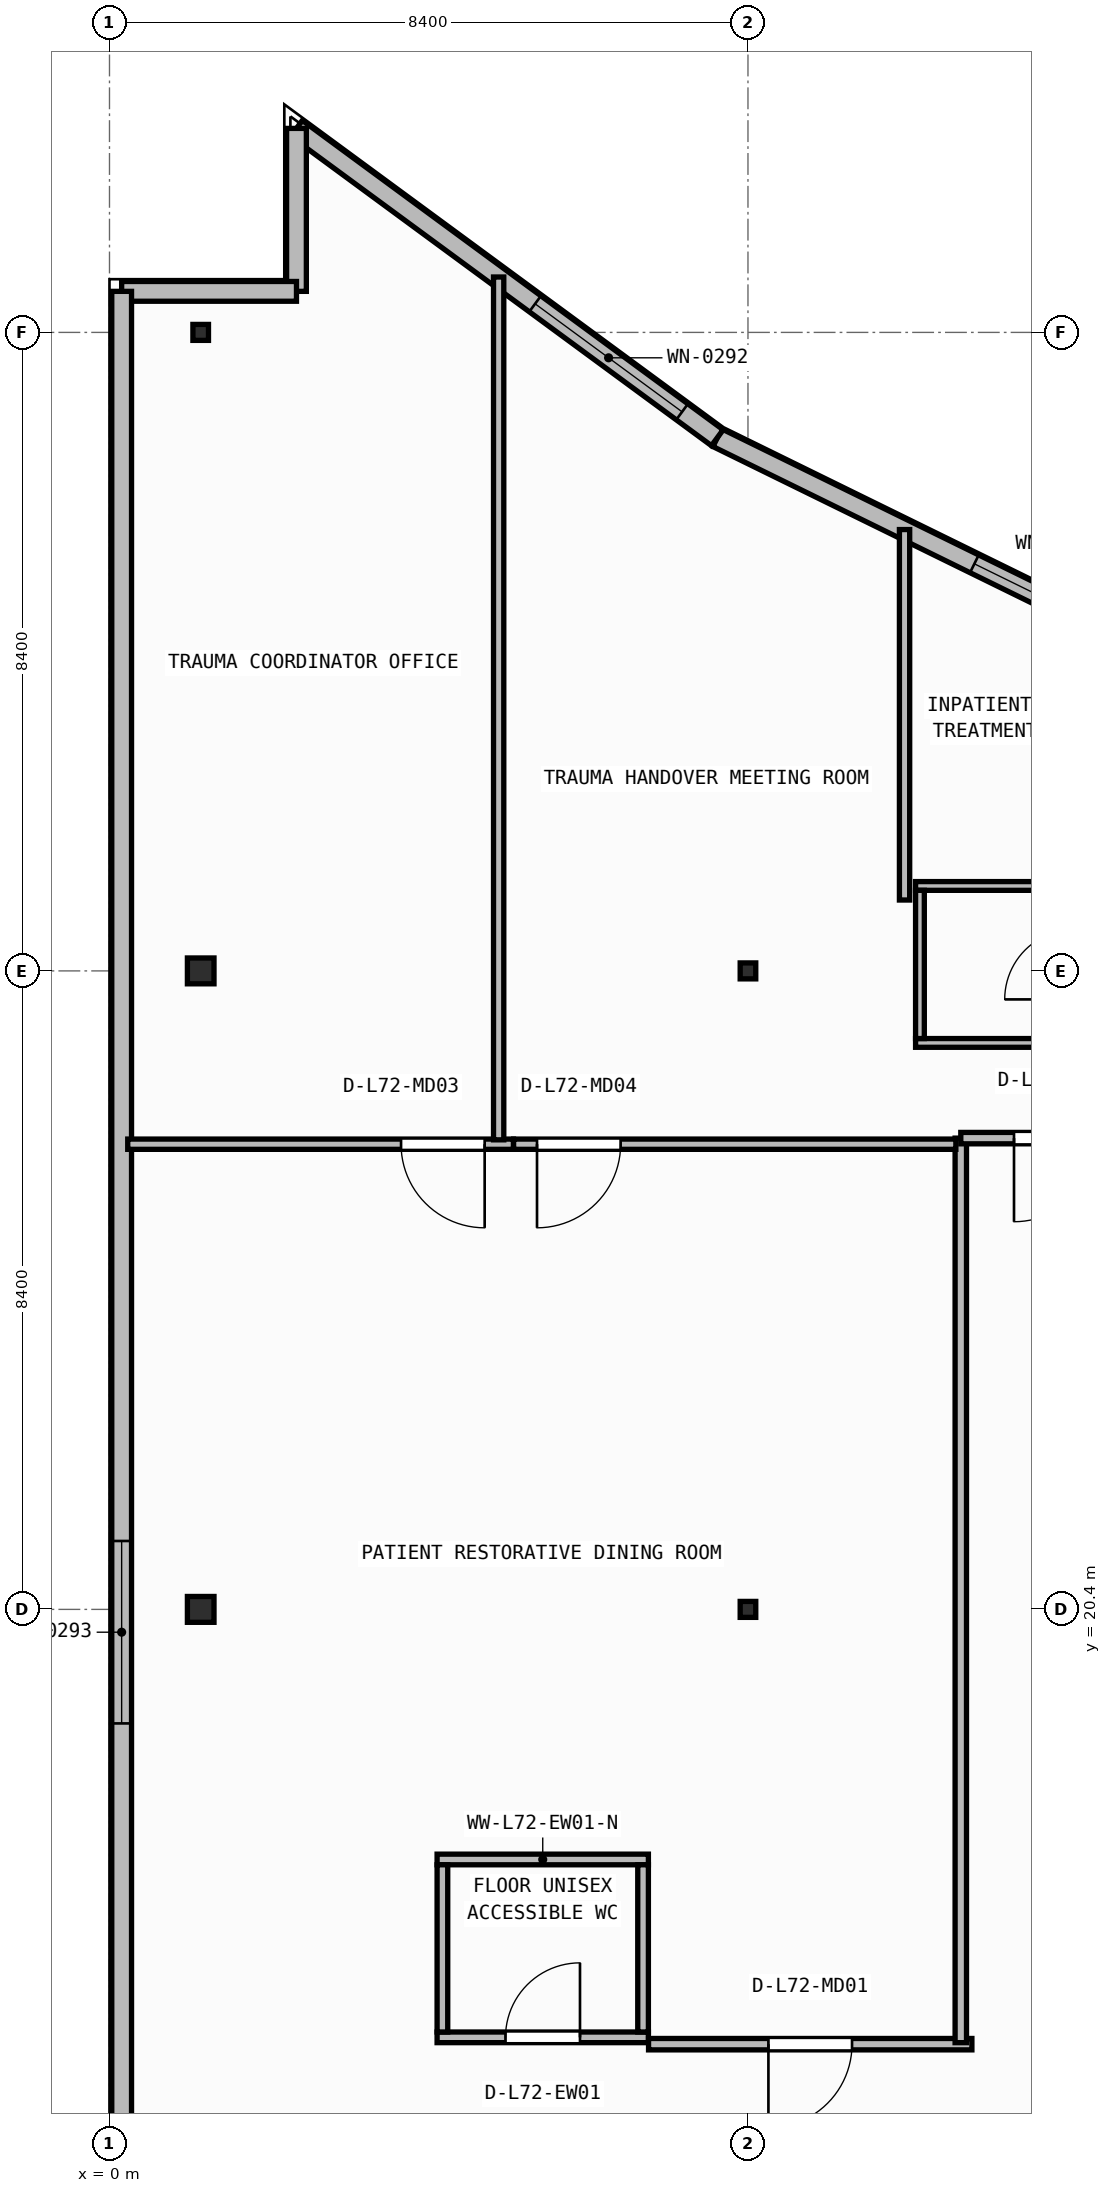
"""IFC4 building model, lengths in metres.
Left out: names, types, materials, properties, quantities, classifications, styles, units other than length and angle.
Written with IfcOpenShell. Run it as: python <this file> out.ifc"""

import sys

from ifc_helpers import new_model, si_unit, direction, frame, frame_2d, origin, origin_2d, place, context, subcontext, project, spatial, rectangle, i_section, extrude, element, fill, save


model = new_model("IFC4")
c1 = context("Model", 3, precision=1e-05, world=origin(), true_north=direction((0.0, 1.0)))
c2 = subcontext(c1, "Body", "Model", "MODEL_VIEW")
j1 = project(units=[si_unit("LENGTHUNIT", "METRE"), si_unit("PLANEANGLEUNIT", "RADIAN")], contexts=[c1])
p1 = place(None, origin())
s1 = spatial("IfcSite", under=j1, at=p1, CompositionType="ELEMENT")
p2 = place(p1, origin())
s2 = spatial("IfcBuilding", under=s1, at=p2, CompositionType="ELEMENT")
p3 = place(p2, frame((0.0, 0.0, 292.1)))
s3 = spatial("IfcBuildingStorey", under=s2, at=p3, CompositionType="ELEMENT", Elevation=292.1)
p4 = place(p3, frame((1.2, 20.4, 0.0), z_axis=(0.0, 0.0, 1.0), x_axis=(1.0, 0.0, 0.0)))
e1 = element("IfcColumn", 1, at=p4, inside=s3, PredefinedType="COLUMN", context=c2, shape_type="SweptSolid", body=[
    extrude(i_section(OverallWidth=0.35, OverallDepth=0.34, WebThickness=0.016, FlangeThickness=0.028, at=origin_2d()), origin(), (0.0, 0.0, 1.0), 3.95),
])
p5 = place(p3, frame((8.4, 20.4, 0.0), z_axis=(0.0, 0.0, 1.0), x_axis=(1.0, 0.0, 0.0)))
e2 = element("IfcColumn", 2, at=p5, inside=s3, PredefinedType="COLUMN", context=c2, shape_type="SweptSolid", body=[
    extrude(i_section(OverallWidth=0.205, OverallDepth=0.21, WebThickness=0.009, FlangeThickness=0.014, FilletRadius=0.011, at=origin_2d()), origin(), (0.0, 0.0, 1.0), 3.95),
])
p6 = place(p3, frame((1.2, 28.8, 0.0), z_axis=(0.0, 0.0, 1.0), x_axis=(1.0, 0.0, 0.0)))
e3 = element("IfcColumn", 3, at=p6, inside=s3, PredefinedType="COLUMN", context=c2, shape_type="SweptSolid", body=[
    extrude(i_section(OverallWidth=0.35, OverallDepth=0.34, WebThickness=0.016, FlangeThickness=0.028, at=origin_2d()), origin(), (0.0, 0.0, 1.0), 3.95),
])
for number, where, z_axis, x_axis in (
    (4, (8.4, 28.8, 0.0), (0.0, 0.0, 1.0), (1.0, 0.0, 0.0)),
    (5, (1.2, 37.2, 0.0), (0.0, 0.0, 1.0), (1.0, 0.0, 0.0)),
):
    element("IfcColumn", number, at=place(p3, frame(where, z_axis=z_axis, x_axis=x_axis)), inside=s3, PredefinedType="COLUMN", context=c2, shape_type="SweptSolid", body=[
        extrude(i_section(OverallWidth=0.205, OverallDepth=0.21, WebThickness=0.009, FlangeThickness=0.014, FilletRadius=0.011, at=origin_2d()), origin(), (0.0, 0.0, 1.0), 3.95),
    ])
p7 = place(p3, frame((16.915, 31.44, 0.0), z_axis=(0.0, 0.0, 1.0), x_axis=(-0.897793077248, 0.440417518322, 0.0)))
e6 = element("IfcWall", 6, at=p7, inside=s3, PredefinedType="STANDARD", context=c2, shape_type="SweptSolid", body=[
    extrude(rectangle(XDim=9.934, YDim=0.26, at=frame_2d((4.967, 0.0))), origin(), (0.0, 0.0, 1.0), 3.71),
])
p8 = place(p7, frame((3.767, 0.0, 0.9)))
e7 = element("IfcOpeningElement", 7, at=p8, cuts=e6, PredefinedType="OPENING", context=c2, shape_type="SweptSolid", body=[
    extrude(rectangle(XDim=2.4, YDim=1.65, at=frame_2d((1.2, 0.825))), frame((0.0, 0.14, 0.0), z_axis=(0.0, -1.0, 0.0), x_axis=(1.0, 0.0, 0.0)), (0.0, 0.0, 1.0), 0.28),
])
p9 = place(p3, frame((7.997, 35.815, 0.0), z_axis=(0.0, 0.0, 1.0), x_axis=(-0.805786654178, 0.592205933733, 0.0)))
e8 = element("IfcWall", 8, at=p9, inside=s3, PredefinedType="STANDARD", context=c2, shape_type="SweptSolid", body=[
    extrude(rectangle(XDim=6.871, YDim=0.26, at=frame_2d((3.436, 0.0))), origin(), (0.0, 0.0, 1.0), 3.71),
])
p10 = place(p9, frame((0.575, 0.0, 0.9)))
e9 = element("IfcOpeningElement", 9, at=p10, cuts=e8, PredefinedType="OPENING", context=c2, shape_type="SweptSolid", body=[
    extrude(rectangle(XDim=2.4, YDim=1.65, at=frame_2d((1.2, 0.825))), frame((0.0, 0.14, 0.0), z_axis=(0.0, -1.0, 0.0), x_axis=(1.0, 0.0, 0.0)), (0.0, 0.0, 1.0), 0.28),
])
p11 = place(p3, frame((2.46, 39.884, 0.0), z_axis=(0.0, 0.0, 1.0), x_axis=(0.0, -1.0, 0.0)))
e10 = element("IfcWall", 10, at=p11, inside=s3, PredefinedType="STANDARD", context=c2, shape_type="SweptSolid", body=[
    extrude(rectangle(XDim=2.144, YDim=0.26, at=frame_2d((1.072, 0.0))), origin(), (0.0, 0.0, 1.0), 3.71),
])
p12 = place(p3, frame((2.46, 37.74, 0.0), z_axis=(0.0, 0.0, 1.0), x_axis=(-1.0, 0.0, 0.0)))
e11 = element("IfcWall", 11, at=p12, inside=s3, PredefinedType="STANDARD", context=c2, shape_type="SweptSolid", body=[
    extrude(rectangle(XDim=2.3, YDim=0.26, at=frame_2d((1.15, 0.0))), origin(), (0.0, 0.0, 1.0), 3.71),
])
p13 = place(p3, frame((0.16, 37.74, 0.0), z_axis=(0.0, 0.0, 1.0), x_axis=(0.0, -1.0, 0.0)))
e12 = element("IfcWall", 12, at=p13, inside=s3, PredefinedType="STANDARD", context=c2, shape_type="SweptSolid", body=[
    extrude(rectangle(XDim=35.28, YDim=0.26, at=frame_2d((17.64, 0.0))), origin(), (0.0, 0.0, 1.0), 3.71),
])
p14 = place(p13, frame((16.44, 0.0, 0.9)))
e13 = element("IfcOpeningElement", 13, at=p14, cuts=e12, PredefinedType="OPENING", context=c2, shape_type="SweptSolid", body=[
    extrude(rectangle(XDim=2.4, YDim=1.65, at=frame_2d((1.2, 0.825))), frame((0.0, 0.14, 0.0), z_axis=(0.0, -1.0, 0.0), x_axis=(1.0, 0.0, 0.0)), (0.0, 0.0, 1.0), 0.28),
])
p15 = place(p3, frame((4.31, 14.77, 0.0), z_axis=(0.0, 0.0, 1.0), x_axis=(1.0, 0.0, 0.0)))
e14 = element("IfcWall", 14, at=p15, inside=s3, PredefinedType="PARTITIONING", context=c2, shape_type="SweptSolid", body=[
    extrude(rectangle(XDim=2.78, YDim=0.14, at=frame_2d((1.39, 0.0))), origin(), (0.0, 0.0, 1.0), 3.71),
])
p16 = place(p15, frame((0.9, 0.0, 0.0)))
e15 = element("IfcOpeningElement", 15, at=p16, cuts=e14, PredefinedType="OPENING", context=c2, shape_type="SweptSolid", body=[
    extrude(rectangle(XDim=0.98, YDim=2.1, at=frame_2d((0.49, 1.05))), frame((0.0, 0.08, 0.0), z_axis=(0.0, -1.0, 0.0), x_axis=(1.0, 0.0, 0.0)), (0.0, 0.0, 1.0), 0.16),
])
p17 = place(p3, frame((4.31, 17.11, 0.0), z_axis=(0.0, 0.0, 1.0), x_axis=(1.0, 0.0, 0.0)))
e16 = element("IfcWall", 16, at=p17, inside=s3, PredefinedType="PARTITIONING", context=c2, shape_type="SweptSolid", body=[
    extrude(rectangle(XDim=2.78, YDim=0.14, at=frame_2d((1.39, 0.0))), origin(), (0.0, 0.0, 1.0), 3.71),
])
for number, where, z_axis, x_axis in (
    (17, (4.38, 14.84, 0.0), (0.0, 0.0, 1.0), (0.0, 1.0, 0.0)),
    (18, (7.02, 14.84, 0.0), (0.0, 0.0, 1.0), (0.0, 1.0, 0.0)),
):
    element("IfcWall", number, at=place(p3, frame(where, z_axis=z_axis, x_axis=x_axis)), inside=s3, PredefinedType="PARTITIONING", context=c2, shape_type="SweptSolid", body=[
        extrude(rectangle(XDim=2.2, YDim=0.14, at=frame_2d((1.1, 0.0))), origin(), (0.0, 0.0, 1.0), 3.71),
    ])
for number, where, z_axis, x_axis in (
    (19, (10.605, 27.853, 0.0), (0.0, 0.0, 1.0), (1.0, 0.0, 0.0)),
    (20, (10.605, 29.917, 0.0), (0.0, 0.0, 1.0), (1.0, 0.0, 0.0)),
):
    element("IfcWall", number, at=place(p3, frame(where, z_axis=z_axis, x_axis=x_axis)), inside=s3, PredefinedType="PARTITIONING", context=c2, shape_type="SweptSolid", body=[
        extrude(rectangle(XDim=2.15, YDim=0.115, at=frame_2d((1.075, 0.0))), origin(), (0.0, 0.0, 1.0), 3.71),
    ])
p18 = place(p3, frame((10.663, 27.91, 0.0), z_axis=(0.0, 0.0, 1.0), x_axis=(0.0, 1.0, 0.0)))
e21 = element("IfcWall", 21, at=p18, inside=s3, PredefinedType="PARTITIONING", context=c2, shape_type="SweptSolid", body=[
    extrude(rectangle(XDim=1.95, YDim=0.115, at=frame_2d((0.975, 0.0))), origin(), (0.0, 0.0, 1.0), 3.71),
])
p19 = place(p3, frame((11.346, 14.68, 0.0), z_axis=(0.0, 0.0, 1.0), x_axis=(-1.0, 0.0, 0.0)))
e22 = element("IfcWall", 22, at=p19, inside=s3, PredefinedType="PARTITIONING", context=c2, shape_type="SweptSolid", body=[
    extrude(rectangle(XDim=4.254, YDim=0.15, at=frame_2d((2.127, 0.0))), origin(), (0.0, 0.0, 1.0), 3.71),
])
p20 = place(p19, frame((1.577, 0.0, 0.0)))
e23 = element("IfcOpeningElement", 23, at=p20, cuts=e22, PredefinedType="OPENING", context=c2, shape_type="SweptSolid", body=[
    extrude(rectangle(XDim=1.1, YDim=2.1, at=frame_2d((0.55, 1.05))), frame((0.0, 0.085, 0.0), z_axis=(0.0, -1.0, 0.0), x_axis=(1.0, 0.0, 0.0)), (0.0, 0.0, 1.0), 0.17),
])
p21 = place(p3, frame((11.2, 26.6, 0.0), z_axis=(0.0, 0.0, 1.0), x_axis=(0.0, -1.0, 0.0)))
e24 = element("IfcWall", 24, at=p21, inside=s3, PredefinedType="PARTITIONING", context=c2, shape_type="SweptSolid", body=[
    extrude(rectangle(XDim=11.9, YDim=0.15, at=frame_2d((5.95, 0.0))), origin(), (0.0, 0.0, 1.0), 3.71),
])
p22 = place(p3, frame((13.7, 26.6, 0.0), z_axis=(0.0, 0.0, 1.0), x_axis=(-1.0, 0.0, 0.0)))
e25 = element("IfcWall", 25, at=p22, inside=s3, PredefinedType="PARTITIONING", context=c2, shape_type="SweptSolid", body=[
    extrude(rectangle(XDim=2.5, YDim=0.15, at=frame_2d((1.25, 0.0))), origin(), (0.0, 0.0, 1.0), 3.71),
])
p23 = place(p22, frame((0.7, 0.0, 0.0)))
e26 = element("IfcOpeningElement", 26, at=p23, cuts=e25, PredefinedType="OPENING", context=c2, shape_type="SweptSolid", body=[
    extrude(rectangle(XDim=1.1, YDim=2.1, at=frame_2d((0.55, 1.05))), frame((0.0, 0.085, 0.0), z_axis=(0.0, -1.0, 0.0), x_axis=(1.0, 0.0, 0.0)), (0.0, 0.0, 1.0), 0.17),
])
p24 = place(p3, frame((5.315, 26.52, 0.0), z_axis=(0.0, 0.0, 1.0), x_axis=(-1.0, 0.0, 0.0)))
e27 = element("IfcWall", 27, at=p24, inside=s3, PredefinedType="PARTITIONING", context=c2, shape_type="SweptSolid", body=[
    extrude(rectangle(XDim=5.075, YDim=0.135, at=frame_2d((2.537, 0.0))), origin(), (0.0, 0.0, 1.0), 3.71),
])
p25 = place(p24, frame((0.379, 0.0, 0.0)))
e28 = element("IfcOpeningElement", 28, at=p25, cuts=e27, PredefinedType="OPENING", context=c2, shape_type="SweptSolid", body=[
    extrude(rectangle(XDim=1.1, YDim=2.1, at=frame_2d((0.55, 1.05))), frame((0.0, 0.077, 0.0), z_axis=(0.0, -1.0, 0.0), x_axis=(1.0, 0.0, 0.0)), (0.0, 0.0, 1.0), 0.155),
])
p26 = place(p3, frame((11.135, 26.52, 0.0), z_axis=(0.0, 0.0, 1.0), x_axis=(-1.0, 0.0, 0.0)))
e29 = element("IfcWall", 29, at=p26, inside=s3, PredefinedType="PARTITIONING", context=c2, shape_type="SweptSolid", body=[
    extrude(rectangle(XDim=5.818, YDim=0.135, at=frame_2d((2.909, 0.0))), origin(), (0.0, 0.0, 1.0), 3.71),
])
p27 = place(p26, frame((4.41, 0.0, 0.0)))
e30 = element("IfcOpeningElement", 30, at=p27, cuts=e29, PredefinedType="OPENING", context=c2, shape_type="SweptSolid", body=[
    extrude(rectangle(XDim=1.1, YDim=2.1, at=frame_2d((0.55, 1.05))), frame((0.0, 0.077, 0.0), z_axis=(0.0, -1.0, 0.0), x_axis=(1.0, 0.0, 0.0)), (0.0, 0.0, 1.0), 0.155),
])
p28 = place(p3, frame((5.12, 26.577, 0.0), z_axis=(0.0, 0.0, 1.0), x_axis=(0.0, 1.0, 0.0)))
e31 = element("IfcWall", 31, at=p28, inside=s3, PredefinedType="PARTITIONING", context=c2, shape_type="SweptSolid", body=[
    extrude(rectangle(XDim=11.352, YDim=0.135, at=frame_2d((5.676, 0.0))), origin(), (0.0, 0.0, 1.0), 3.71),
])
p29 = place(p3, frame((10.46, 29.732, 0.0), z_axis=(0.0, 0.0, 1.0), x_axis=(0.0, 1.0, 0.0)))
e32 = element("IfcWall", 32, at=p29, inside=s3, PredefinedType="PARTITIONING", context=c2, shape_type="SweptSolid", body=[
    extrude(rectangle(XDim=4.874, YDim=0.135, at=frame_2d((2.437, 0.0))), origin(), (0.0, 0.0, 1.0), 3.71),
])
p30 = place(p8, origin())
e33 = element("IfcWindow", 33, at=p30, inside=s3, PartitioningType="SINGLE_PANEL", PredefinedType="WINDOW", context=c2, shape_type="SweptSolid", body=[
    extrude(rectangle(XDim=2.4, YDim=1.65, at=frame_2d((1.2, 0.825))), frame((0.0, 0.03, 0.0), z_axis=(0.0, -1.0, 0.0), x_axis=(1.0, 0.0, 0.0)), (0.0, 0.0, 1.0), 0.06),
])
fill(e7, e33)
p31 = place(p10, origin())
e34 = element("IfcWindow", 34, at=p31, inside=s3, PartitioningType="SINGLE_PANEL", PredefinedType="WINDOW", context=c2, shape_type="SweptSolid", body=[
    extrude(rectangle(XDim=2.4, YDim=1.65, at=frame_2d((1.2, 0.825))), frame((0.0, 0.03, 0.0), z_axis=(0.0, -1.0, 0.0), x_axis=(1.0, 0.0, 0.0)), (0.0, 0.0, 1.0), 0.06),
])
fill(e9, e34)
p32 = place(p14, origin())
e35 = element("IfcWindow", 35, at=p32, inside=s3, PartitioningType="SINGLE_PANEL", PredefinedType="WINDOW", context=c2, shape_type="SweptSolid", body=[
    extrude(rectangle(XDim=2.4, YDim=1.65, at=frame_2d((1.2, 0.825))), frame((0.0, 0.03, 0.0), z_axis=(0.0, -1.0, 0.0), x_axis=(1.0, 0.0, 0.0)), (0.0, 0.0, 1.0), 0.06),
])
fill(e13, e35)
p33 = place(p16, origin())
e36 = element("IfcDoor", 36, at=p33, inside=s3, OperationType="SINGLE_SWING_RIGHT", PredefinedType="DOOR", context=c2, shape_type="SweptSolid", body=[
    extrude(rectangle(XDim=0.98, YDim=2.1, at=frame_2d((0.49, 1.05))), frame((0.0, 0.025, 0.0), z_axis=(0.0, -1.0, 0.0), x_axis=(1.0, 0.0, 0.0)), (0.0, 0.0, 1.0), 0.05),
])
fill(e15, e36)
p34 = place(p20, origin())
e37 = element("IfcDoor", 37, at=p34, inside=s3, OperationType="SINGLE_SWING_RIGHT", PredefinedType="DOOR", context=c2, shape_type="SweptSolid", body=[
    extrude(rectangle(XDim=1.1, YDim=2.1, at=frame_2d((0.55, 1.05))), frame((0.0, 0.025, 0.0), z_axis=(0.0, -1.0, 0.0), x_axis=(1.0, 0.0, 0.0)), (0.0, 0.0, 1.0), 0.05),
])
fill(e23, e37)
p35 = place(p23, origin())
e38 = element("IfcDoor", 38, at=p35, inside=s3, OperationType="SINGLE_SWING_RIGHT", PredefinedType="DOOR", context=c2, shape_type="SweptSolid", body=[
    extrude(rectangle(XDim=1.1, YDim=2.1, at=frame_2d((0.55, 1.05))), frame((0.0, 0.025, 0.0), z_axis=(0.0, -1.0, 0.0), x_axis=(1.0, 0.0, 0.0)), (0.0, 0.0, 1.0), 0.05),
])
fill(e26, e38)
p36 = place(p25, origin())
e39 = element("IfcDoor", 39, at=p36, inside=s3, OperationType="SINGLE_SWING_LEFT", PredefinedType="DOOR", context=c2, shape_type="SweptSolid", body=[
    extrude(rectangle(XDim=1.1, YDim=2.1, at=frame_2d((0.55, 1.05))), frame((0.0, 0.025, 0.0), z_axis=(0.0, -1.0, 0.0), x_axis=(1.0, 0.0, 0.0)), (0.0, 0.0, 1.0), 0.05),
])
fill(e28, e39)
p37 = place(p27, origin())
e40 = element("IfcDoor", 40, at=p37, inside=s3, OperationType="SINGLE_SWING_RIGHT", PredefinedType="DOOR", context=c2, shape_type="SweptSolid", body=[
    extrude(rectangle(XDim=1.1, YDim=2.1, at=frame_2d((0.55, 1.05))), frame((0.0, 0.025, 0.0), z_axis=(0.0, -1.0, 0.0), x_axis=(1.0, 0.0, 0.0)), (0.0, 0.0, 1.0), 0.05),
])
fill(e30, e40)
save(model, sys.argv[1])
